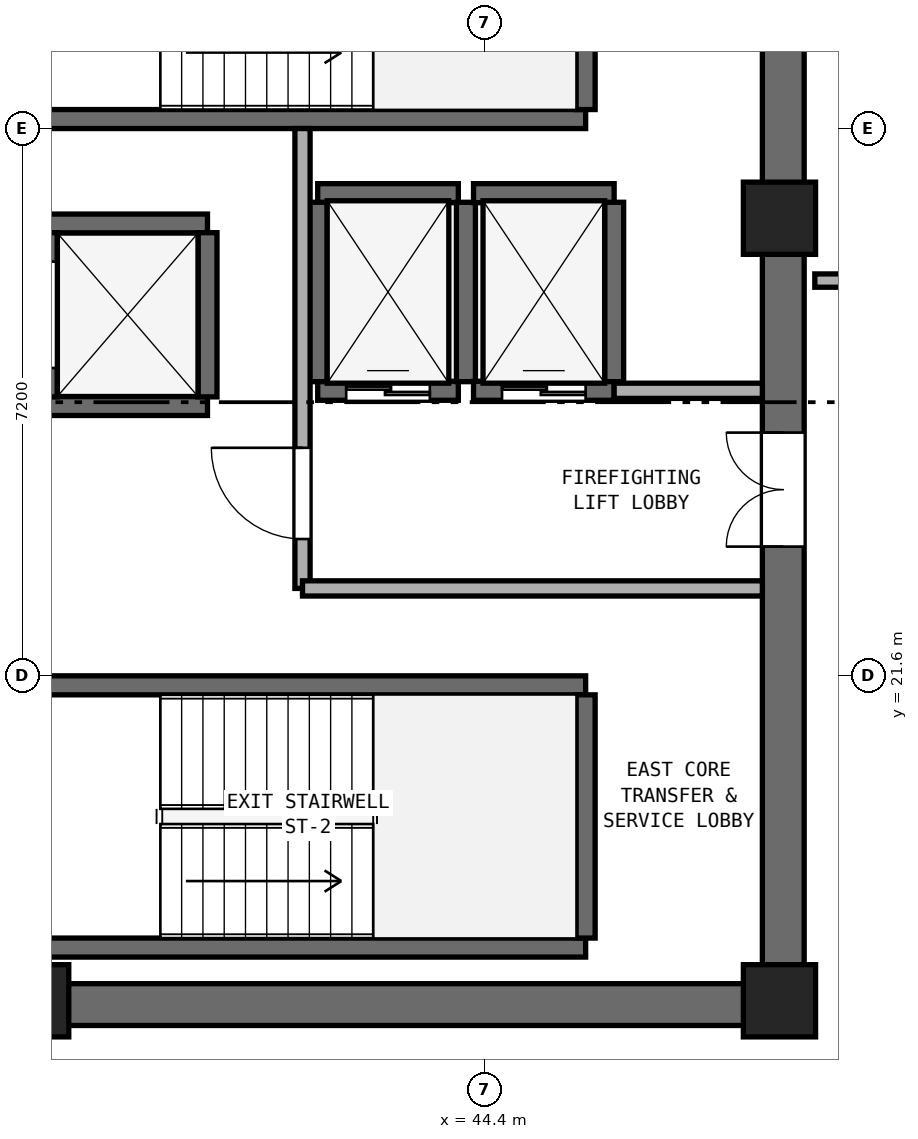
"""IFC4 building model, lengths in metres.
Left out: names, types, materials, properties, quantities, classifications, styles, units other than length and angle.
Written with IfcOpenShell. Run it as: python <this file> out.ifc"""

import sys

from ifc_helpers import new_model, si_unit, direction, frame, frame_2d, origin, origin_2d, place, context, subcontext, project, spatial, rectangle, extrude, element, fill, save


model = new_model("IFC4")
c1 = context("Model", 3, precision=1e-05, world=origin(), true_north=direction((0.0, 1.0)))
c2 = subcontext(c1, "Body", "Model", "MODEL_VIEW")
j1 = project(units=[si_unit("LENGTHUNIT", "METRE"), si_unit("PLANEANGLEUNIT", "RADIAN")], contexts=[c1])
p1 = place(None, origin())
s1 = spatial("IfcSite", under=j1, at=p1, CompositionType="ELEMENT")
p2 = place(p1, origin())
s2 = spatial("IfcBuilding", under=s1, at=p2, CompositionType="ELEMENT")
p3 = place(p2, frame((0.0, 0.0, 128.8)))
s3 = spatial("IfcBuildingStorey", under=s2, at=p3, CompositionType="ELEMENT", Elevation=128.8)
p4 = place(p3, frame((25.4, 17.275, 0.0), z_axis=(0.0, 0.0, 1.0), x_axis=(1.0, 0.0, 0.0)))
e1 = element("IfcWall", 1, at=p4, inside=s3, PredefinedType="SHEAR", context=c2, shape_type="SweptSolid", body=[
    extrude(rectangle(XDim=23.2, YDim=0.55, at=frame_2d((11.6, 0.0))), origin(), (0.0, 0.0, 1.0), 3.54),
])
p5 = place(p3, frame((48.325, 17.55, 0.0), z_axis=(0.0, 0.0, 1.0), x_axis=(0.0, 1.0, 0.0)))
e2 = element("IfcWall", 2, at=p5, inside=s3, PredefinedType="SHEAR", context=c2, shape_type="SweptSolid", body=[
    extrude(rectangle(XDim=15.3, YDim=0.55, at=frame_2d((7.65, 0.0))), origin(), (0.0, 0.0, 1.0), 3.54),
])
p6 = place(p5, frame((5.75, 0.0, 0.0)))
e3 = element("IfcOpeningElement", 3, at=p6, cuts=e2, PredefinedType="OPENING", context=c2, shape_type="SweptSolid", body=[
    extrude(rectangle(XDim=1.5, YDim=2.15, at=frame_2d((0.75, 1.075))), frame((0.0, 0.285, 0.0), z_axis=(0.0, -1.0, 0.0), x_axis=(1.0, 0.0, 0.0)), (0.0, 0.0, 1.0), 0.57),
])
for number, where, z_axis, x_axis in (
    (4, (38.45, 17.325, 0.0), (0.0, 0.0, 1.0), (1.0, 0.0, 0.0)),
    (5, (48.275, 17.325, 0.0), (0.0, 0.0, 1.0), (1.0, 0.0, 0.0)),
    (6, (48.275, 27.62, 0.0), (0.0, 0.0, 1.0), (1.0, 0.0, 0.0)),
):
    element("IfcColumn", number, at=place(p3, frame(where, z_axis=z_axis, x_axis=x_axis)), inside=s3, PredefinedType="PILASTER", context=c2, shape_type="SweptSolid", body=[
        extrude(rectangle(XDim=0.95, YDim=0.95, at=origin_2d()), origin(), (0.0, 0.0, 1.0), 3.8),
    ])
p7 = place(p3, frame((38.425, 28.925, 0.0), z_axis=(0.0, 0.0, 1.0), x_axis=(1.0, 0.0, 0.0)))
e7 = element("IfcWall", 7, at=p7, inside=s3, PredefinedType="SHEAR", context=c2, shape_type="SweptSolid", body=[
    extrude(rectangle(XDim=7.3, YDim=0.25, at=frame_2d((3.65, 0.0))), origin(), (0.0, 0.0, 1.0), 3.54),
])
p8 = place(p3, frame((45.725, 29.05, 0.0), z_axis=(0.0, 0.0, 1.0), x_axis=(0.0, 1.0, 0.0)))
e8 = element("IfcWall", 8, at=p8, inside=s3, PredefinedType="SHEAR", context=c2, shape_type="SweptSolid", body=[
    extrude(rectangle(XDim=3.2, YDim=0.25, at=frame_2d((1.6, 0.0))), origin(), (0.0, 0.0, 1.0), 3.54),
])
for number, where, z_axis, x_axis in (
    (9, (38.425, 18.025, 0.0), (0.0, 0.0, 1.0), (1.0, 0.0, 0.0)),
    (10, (38.425, 21.475, 0.0), (0.0, 0.0, 1.0), (1.0, 0.0, 0.0)),
):
    element("IfcWall", number, at=place(p3, frame(where, z_axis=z_axis, x_axis=x_axis)), inside=s3, PredefinedType="SHEAR", context=c2, shape_type="SweptSolid", body=[
        extrude(rectangle(XDim=7.3, YDim=0.25, at=frame_2d((3.65, 0.0))), origin(), (0.0, 0.0, 1.0), 3.54),
    ])
p9 = place(p3, frame((45.725, 18.15, 0.0), z_axis=(0.0, 0.0, 1.0), x_axis=(0.0, 1.0, 0.0)))
e11 = element("IfcWall", 11, at=p9, inside=s3, PredefinedType="SHEAR", context=c2, shape_type="SweptSolid", body=[
    extrude(rectangle(XDim=3.2, YDim=0.25, at=frame_2d((1.6, 0.0))), origin(), (0.0, 0.0, 1.0), 3.54),
])
p10 = place(p3, frame((42.2, 25.35, 0.0), z_axis=(0.0, 0.0, 1.0), x_axis=(1.0, 0.0, 0.0)))
e12 = element("IfcWall", 12, at=p10, inside=s3, PredefinedType="SHEAR", context=c2, shape_type="SweptSolid", body=[
    extrude(rectangle(XDim=1.85, YDim=0.25, at=frame_2d((0.925, 0.0))), origin(), (0.0, 0.0, 1.0), 3.54),
])
p11 = place(p10, frame((0.375, 0.0, 0.0)))
e13 = element("IfcOpeningElement", 13, at=p11, cuts=e12, PredefinedType="OPENING", context=c2, shape_type="SweptSolid", body=[
    extrude(rectangle(XDim=1.1, YDim=2.15, at=frame_2d((0.55, 1.075))), frame((0.0, 0.135, 0.0), z_axis=(0.0, -1.0, 0.0), x_axis=(1.0, 0.0, 0.0)), (0.0, 0.0, 1.0), 0.27),
])
p12 = place(p3, frame((42.2, 27.95, 0.0), z_axis=(0.0, 0.0, 1.0), x_axis=(1.0, 0.0, 0.0)))
e14 = element("IfcWall", 14, at=p12, inside=s3, PredefinedType="SHEAR", context=c2, shape_type="SweptSolid", body=[
    extrude(rectangle(XDim=1.85, YDim=0.25, at=frame_2d((0.925, 0.0))), origin(), (0.0, 0.0, 1.0), 3.54),
])
for number, where, z_axis, x_axis in (
    (15, (42.2, 25.47, 0.0), (0.0, 0.0, 1.0), (0.0, 1.0, 0.0)),
    (16, (44.15, 25.47, 0.0), (0.0, 0.0, 1.0), (0.0, 1.0, 0.0)),
):
    element("IfcWall", number, at=place(p3, frame(where, z_axis=z_axis, x_axis=x_axis)), inside=s3, PredefinedType="SHEAR", context=c2, shape_type="SweptSolid", body=[
        extrude(rectangle(XDim=2.36, YDim=0.25, at=frame_2d((1.18, 0.0))), origin(), (0.0, 0.0, 1.0), 3.54),
    ])
p13 = place(p3, frame((44.25, 25.35, 0.0), z_axis=(0.0, 0.0, 1.0), x_axis=(1.0, 0.0, 0.0)))
e17 = element("IfcWall", 17, at=p13, inside=s3, PredefinedType="SHEAR", context=c2, shape_type="SweptSolid", body=[
    extrude(rectangle(XDim=1.85, YDim=0.25, at=frame_2d((0.925, 0.0))), origin(), (0.0, 0.0, 1.0), 3.54),
])
p14 = place(p13, frame((0.375, 0.0, 0.0)))
e18 = element("IfcOpeningElement", 18, at=p14, cuts=e17, PredefinedType="OPENING", context=c2, shape_type="SweptSolid", body=[
    extrude(rectangle(XDim=1.1, YDim=2.15, at=frame_2d((0.55, 1.075))), frame((0.0, 0.135, 0.0), z_axis=(0.0, -1.0, 0.0), x_axis=(1.0, 0.0, 0.0)), (0.0, 0.0, 1.0), 0.27),
])
p15 = place(p3, frame((44.25, 27.95, 0.0), z_axis=(0.0, 0.0, 1.0), x_axis=(1.0, 0.0, 0.0)))
e19 = element("IfcWall", 19, at=p15, inside=s3, PredefinedType="SHEAR", context=c2, shape_type="SweptSolid", body=[
    extrude(rectangle(XDim=1.85, YDim=0.25, at=frame_2d((0.925, 0.0))), origin(), (0.0, 0.0, 1.0), 3.54),
])
p16 = place(p3, frame((46.1, 25.47, 0.0), z_axis=(0.0, 0.0, 1.0), x_axis=(0.0, 1.0, 0.0)))
e20 = element("IfcWall", 20, at=p16, inside=s3, PredefinedType="SHEAR", context=c2, shape_type="SweptSolid", body=[
    extrude(rectangle(XDim=2.36, YDim=0.25, at=frame_2d((1.18, 0.0))), origin(), (0.0, 0.0, 1.0), 3.54),
])
for number, where, z_axis, x_axis in (
    (21, (38.65, 25.15, 0.0), (0.0, 0.0, 1.0), (1.0, 0.0, 0.0)),
    (22, (38.65, 27.55, 0.0), (0.0, 0.0, 1.0), (1.0, 0.0, 0.0)),
):
    element("IfcWall", number, at=place(p3, frame(where, z_axis=z_axis, x_axis=x_axis)), inside=s3, PredefinedType="SHEAR", context=c2, shape_type="SweptSolid", body=[
        extrude(rectangle(XDim=2.1, YDim=0.25, at=frame_2d((1.05, 0.0))), origin(), (0.0, 0.0, 1.0), 3.54),
    ])
p17 = place(p3, frame((38.65, 25.27, 0.0), z_axis=(0.0, 0.0, 1.0), x_axis=(0.0, 1.0, 0.0)))
e23 = element("IfcWall", 23, at=p17, inside=s3, PredefinedType="SHEAR", context=c2, shape_type="SweptSolid", body=[
    extrude(rectangle(XDim=2.16, YDim=0.25, at=frame_2d((1.08, 0.0))), origin(), (0.0, 0.0, 1.0), 3.54),
])
p18 = place(p17, frame((0.38, 0.0, 0.0)))
e24 = element("IfcOpeningElement", 24, at=p18, cuts=e23, PredefinedType="OPENING", context=c2, shape_type="SweptSolid", body=[
    extrude(rectangle(XDim=1.4, YDim=2.2, at=frame_2d((0.7, 1.1))), frame((0.0, 0.135, 0.0), z_axis=(0.0, -1.0, 0.0), x_axis=(1.0, 0.0, 0.0)), (0.0, 0.0, 1.0), 0.27),
])
p19 = place(p3, frame((40.75, 25.27, 0.0), z_axis=(0.0, 0.0, 1.0), x_axis=(0.0, 1.0, 0.0)))
e25 = element("IfcWall", 25, at=p19, inside=s3, PredefinedType="SHEAR", context=c2, shape_type="SweptSolid", body=[
    extrude(rectangle(XDim=2.16, YDim=0.25, at=frame_2d((1.08, 0.0))), origin(), (0.0, 0.0, 1.0), 3.54),
])
p20 = place(p3, frame((42.0, 22.75, 0.0), z_axis=(0.0, 0.0, 1.0), x_axis=(0.0, 1.0, 0.0)))
e26 = element("IfcWall", 26, at=p20, inside=s3, PredefinedType="SOLIDWALL", context=c2, shape_type="SweptSolid", body=[
    extrude(rectangle(XDim=6.05, YDim=0.2, at=frame_2d((3.025, 0.0))), origin(), (0.0, 0.0, 1.0), 3.54),
])
p21 = place(p20, frame((0.65, 0.0, 0.0)))
e27 = element("IfcOpeningElement", 27, at=p21, cuts=e26, PredefinedType="OPENING", context=c2, shape_type="SweptSolid", body=[
    extrude(rectangle(XDim=1.2, YDim=2.15, at=frame_2d((0.6, 1.075))), frame((0.0, 0.11, 0.0), z_axis=(0.0, -1.0, 0.0), x_axis=(1.0, 0.0, 0.0)), (0.0, 0.0, 1.0), 0.22),
])
p22 = place(p3, frame((42.0, 22.75, 0.0), z_axis=(0.0, 0.0, 1.0), x_axis=(1.0, 0.0, 0.0)))
e28 = element("IfcWall", 28, at=p22, inside=s3, PredefinedType="SOLIDWALL", context=c2, shape_type="SweptSolid", body=[
    extrude(rectangle(XDim=6.05, YDim=0.2, at=frame_2d((3.025, 0.0))), origin(), (0.0, 0.0, 1.0), 3.54),
])
p23 = place(p3, frame((46.1, 25.35, 0.0), z_axis=(0.0, 0.0, 1.0), x_axis=(1.0, 0.0, 0.0)))
e29 = element("IfcWall", 29, at=p23, inside=s3, PredefinedType="SOLIDWALL", context=c2, shape_type="SweptSolid", body=[
    extrude(rectangle(XDim=1.95, YDim=0.2, at=frame_2d((0.975, 0.0))), origin(), (0.0, 0.0, 1.0), 3.54),
])
p24 = place(p3, frame((48.74, 26.8, 0.0), z_axis=(0.0, 0.0, 1.0), x_axis=(1.0, 0.0, 0.0)))
e30 = element("IfcWall", 30, at=p24, inside=s3, PredefinedType="PARTITIONING", context=c2, shape_type="SweptSolid", body=[
    extrude(rectangle(XDim=2.61, YDim=0.175, at=frame_2d((1.305, 0.0))), origin(), (0.0, 0.0, 1.0), 3.54),
])
p25 = place(p11, origin())
e31 = element("IfcDoor", 31, at=p25, inside=s3, OperationType="DOUBLE_DOOR_SLIDING", PredefinedType="DOOR", context=c2, shape_type="SweptSolid", body=[
    extrude(rectangle(XDim=1.1, YDim=2.15, at=frame_2d((0.55, 1.075))), frame((0.0, 0.025, 0.0), z_axis=(0.0, -1.0, 0.0), x_axis=(1.0, 0.0, 0.0)), (0.0, 0.0, 1.0), 0.05),
])
fill(e13, e31)
p26 = place(p14, origin())
e32 = element("IfcDoor", 32, at=p26, inside=s3, OperationType="DOUBLE_DOOR_SLIDING", PredefinedType="DOOR", context=c2, shape_type="SweptSolid", body=[
    extrude(rectangle(XDim=1.1, YDim=2.15, at=frame_2d((0.55, 1.075))), frame((0.0, 0.025, 0.0), z_axis=(0.0, -1.0, 0.0), x_axis=(1.0, 0.0, 0.0)), (0.0, 0.0, 1.0), 0.05),
])
fill(e18, e32)
p27 = place(p21, origin())
e33 = element("IfcDoor", 33, at=p27, inside=s3, OperationType="SINGLE_SWING_RIGHT", PredefinedType="DOOR", context=c2, shape_type="SweptSolid", body=[
    extrude(rectangle(XDim=1.2, YDim=2.15, at=frame_2d((0.6, 1.075))), frame((0.0, 0.025, 0.0), z_axis=(0.0, -1.0, 0.0), x_axis=(1.0, 0.0, 0.0)), (0.0, 0.0, 1.0), 0.05),
])
fill(e27, e33)
p28 = place(p6, origin())
e34 = element("IfcDoor", 34, at=p28, inside=s3, OperationType="DOUBLE_DOOR_SINGLE_SWING", PredefinedType="DOOR", context=c2, shape_type="SweptSolid", body=[
    extrude(rectangle(XDim=1.5, YDim=2.15, at=frame_2d((0.75, 1.075))), frame((0.0, 0.025, 0.0), z_axis=(0.0, -1.0, 0.0), x_axis=(1.0, 0.0, 0.0)), (0.0, 0.0, 1.0), 0.05),
])
fill(e3, e34)
save(model, sys.argv[1])
